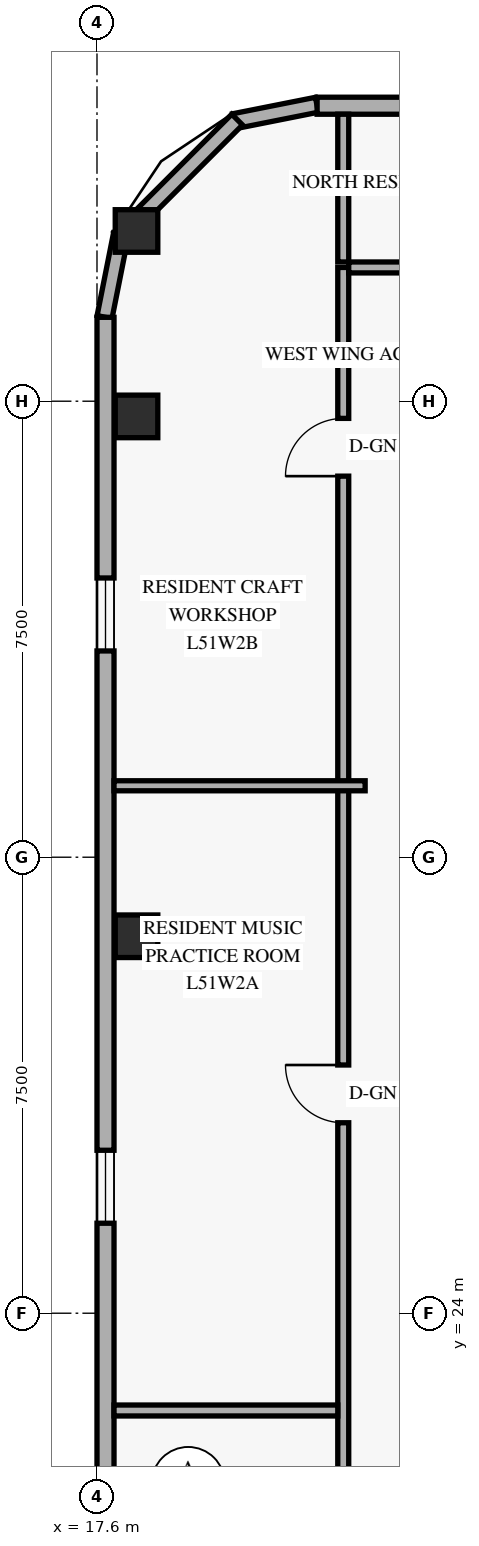
"""IFC4 building model, lengths in metres.
Left out: names, types, materials, properties, quantities, classifications, styles, units other than length and angle.
Written with IfcOpenShell. Run it as: python <this file> out.ifc"""

import sys

from ifc_helpers import new_model, si_unit, direction, frame, frame_2d, origin, origin_2d, place, context, subcontext, project, spatial, rectangle, extrude, element, fill, save


model = new_model("IFC4")
c1 = context("Model", 3, precision=1e-05, world=origin(), true_north=direction((0.0, 1.0)))
c2 = subcontext(c1, "Body", "Model", "MODEL_VIEW")
j1 = project(units=[si_unit("LENGTHUNIT", "METRE"), si_unit("PLANEANGLEUNIT", "RADIAN")], contexts=[c1])
p1 = place(None, origin())
s1 = spatial("IfcSite", under=j1, at=p1, CompositionType="ELEMENT")
p2 = place(p1, origin())
s2 = spatial("IfcBuilding", under=s1, at=p2, CompositionType="ELEMENT")
p3 = place(p2, frame((0.0, 0.0, 196.2)))
s3 = spatial("IfcBuildingStorey", under=s2, at=p3, CompositionType="ELEMENT", Elevation=196.2)
for number, where, z_axis, x_axis in (
    (1, (18.25, 30.2, 0.0), (0.0, 0.0, 1.0), (1.0, 0.0, 0.0)),
    (2, (18.25, 38.75, 0.0), (0.0, 0.0, 1.0), (1.0, 0.0, 0.0)),
    (3, (18.25, 41.8, 0.0), (0.0, 0.0, 1.0), (1.0, 0.0, 0.0)),
):
    element("IfcColumn", number, at=place(p3, frame(where, z_axis=z_axis, x_axis=x_axis)), inside=s3, PredefinedType="COLUMN", context=c2, shape_type="SweptSolid", body=[
        extrude(rectangle(XDim=0.7, YDim=0.7, at=origin_2d()), origin(), (0.0, 0.0, 1.0), 3.6),
    ])
p4 = place(p3, frame((21.217, 43.876, 0.0), z_axis=(0.0, 0.0, 1.0), x_axis=(-0.980809899341, -0.19496651342, 0.0)))
e4 = element("IfcWall", 4, at=p4, inside=s3, PredefinedType="SOLIDWALL", context=c2, shape_type="SweptSolid", body=[
    extrude(rectangle(XDim=1.389, YDim=0.25, at=frame_2d((0.694, 0.0))), origin(), (0.0, 0.0, 1.0), 3.3),
])
p5 = place(p3, frame((19.905, 43.632, 0.0), z_axis=(0.0, 0.0, 1.0), x_axis=(-0.707106781187, -0.707106781187, 0.0)))
e5 = element("IfcWall", 5, at=p5, inside=s3, PredefinedType="SOLIDWALL", context=c2, shape_type="SweptSolid", body=[
    extrude(rectangle(XDim=2.739, YDim=0.25, at=frame_2d((1.37, 0.0))), origin(), (0.0, 0.0, 1.0), 3.3),
])
p6 = place(p3, frame((17.995, 41.746, 0.0), z_axis=(0.0, 0.0, 1.0), x_axis=(-0.195135625965, -0.9807762678, 0.0)))
e6 = element("IfcWall", 6, at=p6, inside=s3, PredefinedType="SOLIDWALL", context=c2, shape_type="SweptSolid", body=[
    extrude(rectangle(XDim=1.389, YDim=0.25, at=frame_2d((0.694, 0.0))), origin(), (0.0, 0.0, 1.0), 3.3),
])
p7 = place(p3, frame((54.98, 43.86, 0.0), z_axis=(0.0, 0.0, 1.0), x_axis=(-1.0, 0.0, 0.0)))
e7 = element("IfcWall", 7, at=p7, inside=s3, PredefinedType="SOLIDWALL", context=c2, shape_type="SweptSolid", body=[
    extrude(rectangle(XDim=33.76, YDim=0.28, at=frame_2d((16.88, 0.0))), origin(), (0.0, 0.0, 1.0), 3.3),
])
p8 = place(p7, frame((28.055, 0.0, 0.85)))
e8 = element("IfcOpeningElement", 8, at=p8, cuts=e7, PredefinedType="OPENING", context=c2, shape_type="SweptSolid", body=[
    extrude(rectangle(XDim=1.8, YDim=1.6, at=frame_2d((0.9, 0.8))), frame((0.0, 0.15, 0.0), z_axis=(0.0, -1.0, 0.0), x_axis=(1.0, 0.0, 0.0)), (0.0, 0.0, 1.0), 0.3),
])
p9 = place(p7, frame((21.17, 0.0, 0.85)))
e9 = element("IfcOpeningElement", 9, at=p9, cuts=e7, PredefinedType="OPENING", context=c2, shape_type="SweptSolid", body=[
    extrude(rectangle(XDim=1.8, YDim=1.6, at=frame_2d((0.9, 0.8))), frame((0.0, 0.15, 0.0), z_axis=(0.0, -1.0, 0.0), x_axis=(1.0, 0.0, 0.0)), (0.0, 0.0, 1.0), 0.3),
])
p10 = place(p7, frame((17.165, 0.0, 0.85)))
e10 = element("IfcOpeningElement", 10, at=p10, cuts=e7, PredefinedType="OPENING", context=c2, shape_type="SweptSolid", body=[
    extrude(rectangle(XDim=1.8, YDim=1.6, at=frame_2d((0.9, 0.8))), frame((0.0, 0.15, 0.0), z_axis=(0.0, -1.0, 0.0), x_axis=(1.0, 0.0, 0.0)), (0.0, 0.0, 1.0), 0.3),
])
p11 = place(p7, frame((12.77, 0.0, 0.85)))
e11 = element("IfcOpeningElement", 11, at=p11, cuts=e7, PredefinedType="OPENING", context=c2, shape_type="SweptSolid", body=[
    extrude(rectangle(XDim=1.8, YDim=1.6, at=frame_2d((0.9, 0.8))), frame((0.0, 0.15, 0.0), z_axis=(0.0, -1.0, 0.0), x_axis=(1.0, 0.0, 0.0)), (0.0, 0.0, 1.0), 0.3),
])
p12 = place(p7, frame((7.375, 0.0, 0.85)))
e12 = element("IfcOpeningElement", 12, at=p12, cuts=e7, PredefinedType="OPENING", context=c2, shape_type="SweptSolid", body=[
    extrude(rectangle(XDim=1.8, YDim=1.6, at=frame_2d((0.9, 0.8))), frame((0.0, 0.15, 0.0), z_axis=(0.0, -1.0, 0.0), x_axis=(1.0, 0.0, 0.0)), (0.0, 0.0, 1.0), 0.3),
])
p13 = place(p7, frame((4.28, 0.0, 0.85)))
e13 = element("IfcOpeningElement", 13, at=p13, cuts=e7, PredefinedType="OPENING", context=c2, shape_type="SweptSolid", body=[
    extrude(rectangle(XDim=1.2, YDim=1.5, at=frame_2d((0.6, 0.75))), frame((0.0, 0.15, 0.0), z_axis=(0.0, -1.0, 0.0), x_axis=(1.0, 0.0, 0.0)), (0.0, 0.0, 1.0), 0.3),
])
p14 = place(p7, frame((1.09, 0.0, 0.85)))
e14 = element("IfcOpeningElement", 14, at=p14, cuts=e7, PredefinedType="OPENING", context=c2, shape_type="SweptSolid", body=[
    extrude(rectangle(XDim=1.8, YDim=1.6, at=frame_2d((0.9, 0.8))), frame((0.0, 0.15, 0.0), z_axis=(0.0, -1.0, 0.0), x_axis=(1.0, 0.0, 0.0)), (0.0, 0.0, 1.0), 0.3),
])
p15 = place(p3, frame((17.74, 40.38, 0.0), z_axis=(0.0, 0.0, 1.0), x_axis=(0.0, -1.0, 0.0)))
e15 = element("IfcWall", 15, at=p15, inside=s3, PredefinedType="SOLIDWALL", context=c2, shape_type="SweptSolid", body=[
    extrude(rectangle(XDim=32.76, YDim=0.28, at=frame_2d((16.38, 0.0))), origin(), (0.0, 0.0, 1.0), 3.3),
])
p16 = place(p15, frame((28.073, 0.0, 0.85)))
e16 = element("IfcOpeningElement", 16, at=p16, cuts=e15, PredefinedType="OPENING", context=c2, shape_type="SweptSolid", body=[
    extrude(rectangle(XDim=1.2, YDim=1.5, at=frame_2d((0.6, 0.75))), frame((0.0, 0.15, 0.0), z_axis=(0.0, -1.0, 0.0), x_axis=(1.0, 0.0, 0.0)), (0.0, 0.0, 1.0), 0.3),
])
p17 = place(p15, frame((19.585, 0.0, 0.85)))
e17 = element("IfcOpeningElement", 17, at=p17, cuts=e15, PredefinedType="OPENING", context=c2, shape_type="SweptSolid", body=[
    extrude(rectangle(XDim=1.2, YDim=1.5, at=frame_2d((0.6, 0.75))), frame((0.0, 0.15, 0.0), z_axis=(0.0, -1.0, 0.0), x_axis=(1.0, 0.0, 0.0)), (0.0, 0.0, 1.0), 0.3),
])
p18 = place(p15, frame((13.7, 0.0, 0.85)))
e18 = element("IfcOpeningElement", 18, at=p18, cuts=e15, PredefinedType="OPENING", context=c2, shape_type="SweptSolid", body=[
    extrude(rectangle(XDim=1.2, YDim=1.5, at=frame_2d((0.6, 0.75))), frame((0.0, 0.15, 0.0), z_axis=(0.0, -1.0, 0.0), x_axis=(1.0, 0.0, 0.0)), (0.0, 0.0, 1.0), 0.3),
])
p19 = place(p15, frame((4.288, 0.0, 0.85)))
e19 = element("IfcOpeningElement", 19, at=p19, cuts=e15, PredefinedType="OPENING", context=c2, shape_type="SweptSolid", body=[
    extrude(rectangle(XDim=1.2, YDim=1.5, at=frame_2d((0.6, 0.75))), frame((0.0, 0.15, 0.0), z_axis=(0.0, -1.0, 0.0), x_axis=(1.0, 0.0, 0.0)), (0.0, 0.0, 1.0), 0.3),
])
p20 = place(p3, frame((21.65, 6.8, 0.0), z_axis=(0.0, 0.0, 1.0), x_axis=(0.0, 1.0, 0.0)))
e20 = element("IfcWall", 20, at=p20, inside=s3, PredefinedType="STANDARD", context=c2, shape_type="SweptSolid", body=[
    extrude(rectangle(XDim=34.4, YDim=0.18, at=frame_2d((17.2, 0.0))), origin(), (0.0, 0.0, 1.0), 2.67),
])
p21 = place(p20, frame((1.732, 0.0, 0.0)))
e21 = element("IfcOpeningElement", 21, at=p21, cuts=e20, PredefinedType="OPENING", context=c2, shape_type="SweptSolid", body=[
    extrude(rectangle(XDim=0.95, YDim=2.15, at=frame_2d((0.475, 1.075))), frame((0.0, 0.1, 0.0), z_axis=(0.0, -1.0, 0.0), x_axis=(1.0, 0.0, 0.0)), (0.0, 0.0, 1.0), 0.2),
])
p22 = place(p20, frame((10.768, 0.0, 0.0)))
e22 = element("IfcOpeningElement", 22, at=p22, cuts=e20, PredefinedType="OPENING", context=c2, shape_type="SweptSolid", body=[
    extrude(rectangle(XDim=0.95, YDim=2.15, at=frame_2d((0.475, 1.075))), frame((0.0, 0.1, 0.0), z_axis=(0.0, -1.0, 0.0), x_axis=(1.0, 0.0, 0.0)), (0.0, 0.0, 1.0), 0.2),
])
p23 = place(p20, frame((20.333, 0.0, 0.0)))
e23 = element("IfcOpeningElement", 23, at=p23, cuts=e20, PredefinedType="OPENING", context=c2, shape_type="SweptSolid", body=[
    extrude(rectangle(XDim=0.95, YDim=2.15, at=frame_2d((0.475, 1.075))), frame((0.0, 0.1, 0.0), z_axis=(0.0, -1.0, 0.0), x_axis=(1.0, 0.0, 0.0)), (0.0, 0.0, 1.0), 0.2),
])
p24 = place(p20, frame((30.968, 0.0, 0.0)))
e24 = element("IfcOpeningElement", 24, at=p24, cuts=e20, PredefinedType="OPENING", context=c2, shape_type="SweptSolid", body=[
    extrude(rectangle(XDim=0.95, YDim=2.15, at=frame_2d((0.475, 1.075))), frame((0.0, 0.1, 0.0), z_axis=(0.0, -1.0, 0.0), x_axis=(1.0, 0.0, 0.0)), (0.0, 0.0, 1.0), 0.2),
])
p25 = place(p3, frame((21.74, 41.2, 0.0), z_axis=(0.0, 0.0, 1.0), x_axis=(1.0, 0.0, 0.0)))
e25 = element("IfcWall", 25, at=p25, inside=s3, PredefinedType="STANDARD", context=c2, shape_type="SweptSolid", body=[
    extrude(rectangle(XDim=13.68, YDim=0.18, at=frame_2d((6.84, 0.0))), origin(), (0.0, 0.0, 1.0), 2.67),
])
p26 = place(p25, frame((2.95, 0.0, 0.0)))
e26 = element("IfcOpeningElement", 26, at=p26, cuts=e25, PredefinedType="OPENING", context=c2, shape_type="SweptSolid", body=[
    extrude(rectangle(XDim=0.95, YDim=2.15, at=frame_2d((0.475, 1.075))), frame((0.0, 0.1, 0.0), z_axis=(0.0, -1.0, 0.0), x_axis=(1.0, 0.0, 0.0)), (0.0, 0.0, 1.0), 0.2),
])
p27 = place(p25, frame((10.11, 0.0, 0.0)))
e27 = element("IfcOpeningElement", 27, at=p27, cuts=e25, PredefinedType="OPENING", context=c2, shape_type="SweptSolid", body=[
    extrude(rectangle(XDim=0.95, YDim=2.15, at=frame_2d((0.475, 1.075))), frame((0.0, 0.1, 0.0), z_axis=(0.0, -1.0, 0.0), x_axis=(1.0, 0.0, 0.0)), (0.0, 0.0, 1.0), 0.2),
])
p28 = place(p3, frame((21.65, 41.29, 0.0), z_axis=(0.0, 0.0, 1.0), x_axis=(0.0, 1.0, 0.0)))
e28 = element("IfcWall", 28, at=p28, inside=s3, PredefinedType="PARTITIONING", context=c2, shape_type="SweptSolid", body=[
    extrude(rectangle(XDim=2.43, YDim=0.18, at=frame_2d((1.215, 0.0))), origin(), (0.0, 0.0, 1.0), 2.819),
])
p29 = place(p3, frame((17.88, 22.4, 0.0), z_axis=(0.0, 0.0, 1.0), x_axis=(1.0, 0.0, 0.0)))
e29 = element("IfcWall", 29, at=p29, inside=s3, PredefinedType="PARTITIONING", context=c2, shape_type="SweptSolid", body=[
    extrude(rectangle(XDim=3.68, YDim=0.18, at=frame_2d((1.84, 0.0))), origin(), (0.0, 0.0, 1.0), 2.819),
])
p30 = place(p3, frame((17.88, 32.675, 0.0), z_axis=(0.0, 0.0, 1.0), x_axis=(1.0, 0.0, 0.0)))
e30 = element("IfcWall", 30, at=p30, inside=s3, PredefinedType="PARTITIONING", context=c2, shape_type="SweptSolid", body=[
    extrude(rectangle(XDim=4.13, YDim=0.165, at=frame_2d((2.065, 0.0))), origin(), (0.0, 0.0, 1.0), 2.819),
])
p31 = place(p18, origin())
e31 = element("IfcWindow", 31, at=p31, inside=s3, PartitioningType="SINGLE_PANEL", PredefinedType="WINDOW", context=c2, shape_type="SweptSolid", body=[
    extrude(rectangle(XDim=1.2, YDim=1.5, at=frame_2d((0.6, 0.75))), frame((0.0, 0.03, 0.0), z_axis=(0.0, -1.0, 0.0), x_axis=(1.0, 0.0, 0.0)), (0.0, 0.0, 1.0), 0.06),
])
fill(e18, e31)
p32 = place(p19, origin())
e32 = element("IfcWindow", 32, at=p32, inside=s3, PartitioningType="SINGLE_PANEL", PredefinedType="WINDOW", context=c2, shape_type="SweptSolid", body=[
    extrude(rectangle(XDim=1.2, YDim=1.5, at=frame_2d((0.6, 0.75))), frame((0.0, 0.03, 0.0), z_axis=(0.0, -1.0, 0.0), x_axis=(1.0, 0.0, 0.0)), (0.0, 0.0, 1.0), 0.06),
])
fill(e19, e32)
p33 = place(p23, origin())
e33 = element("IfcDoor", 33, at=p33, inside=s3, OperationType="SINGLE_SWING_RIGHT", PredefinedType="DOOR", context=c2, shape_type="SweptSolid", body=[
    extrude(rectangle(XDim=0.95, YDim=2.15, at=frame_2d((0.475, 1.075))), frame((0.0, 0.025, 0.0), z_axis=(0.0, -1.0, 0.0), x_axis=(1.0, 0.0, 0.0)), (0.0, 0.0, 1.0), 0.05),
])
fill(e23, e33)
p34 = place(p24, origin())
e34 = element("IfcDoor", 34, at=p34, inside=s3, OperationType="SINGLE_SWING_LEFT", PredefinedType="DOOR", context=c2, shape_type="SweptSolid", body=[
    extrude(rectangle(XDim=0.95, YDim=2.15, at=frame_2d((0.475, 1.075))), frame((0.0, 0.025, 0.0), z_axis=(0.0, -1.0, 0.0), x_axis=(1.0, 0.0, 0.0)), (0.0, 0.0, 1.0), 0.05),
])
fill(e24, e34)
save(model, sys.argv[1])
